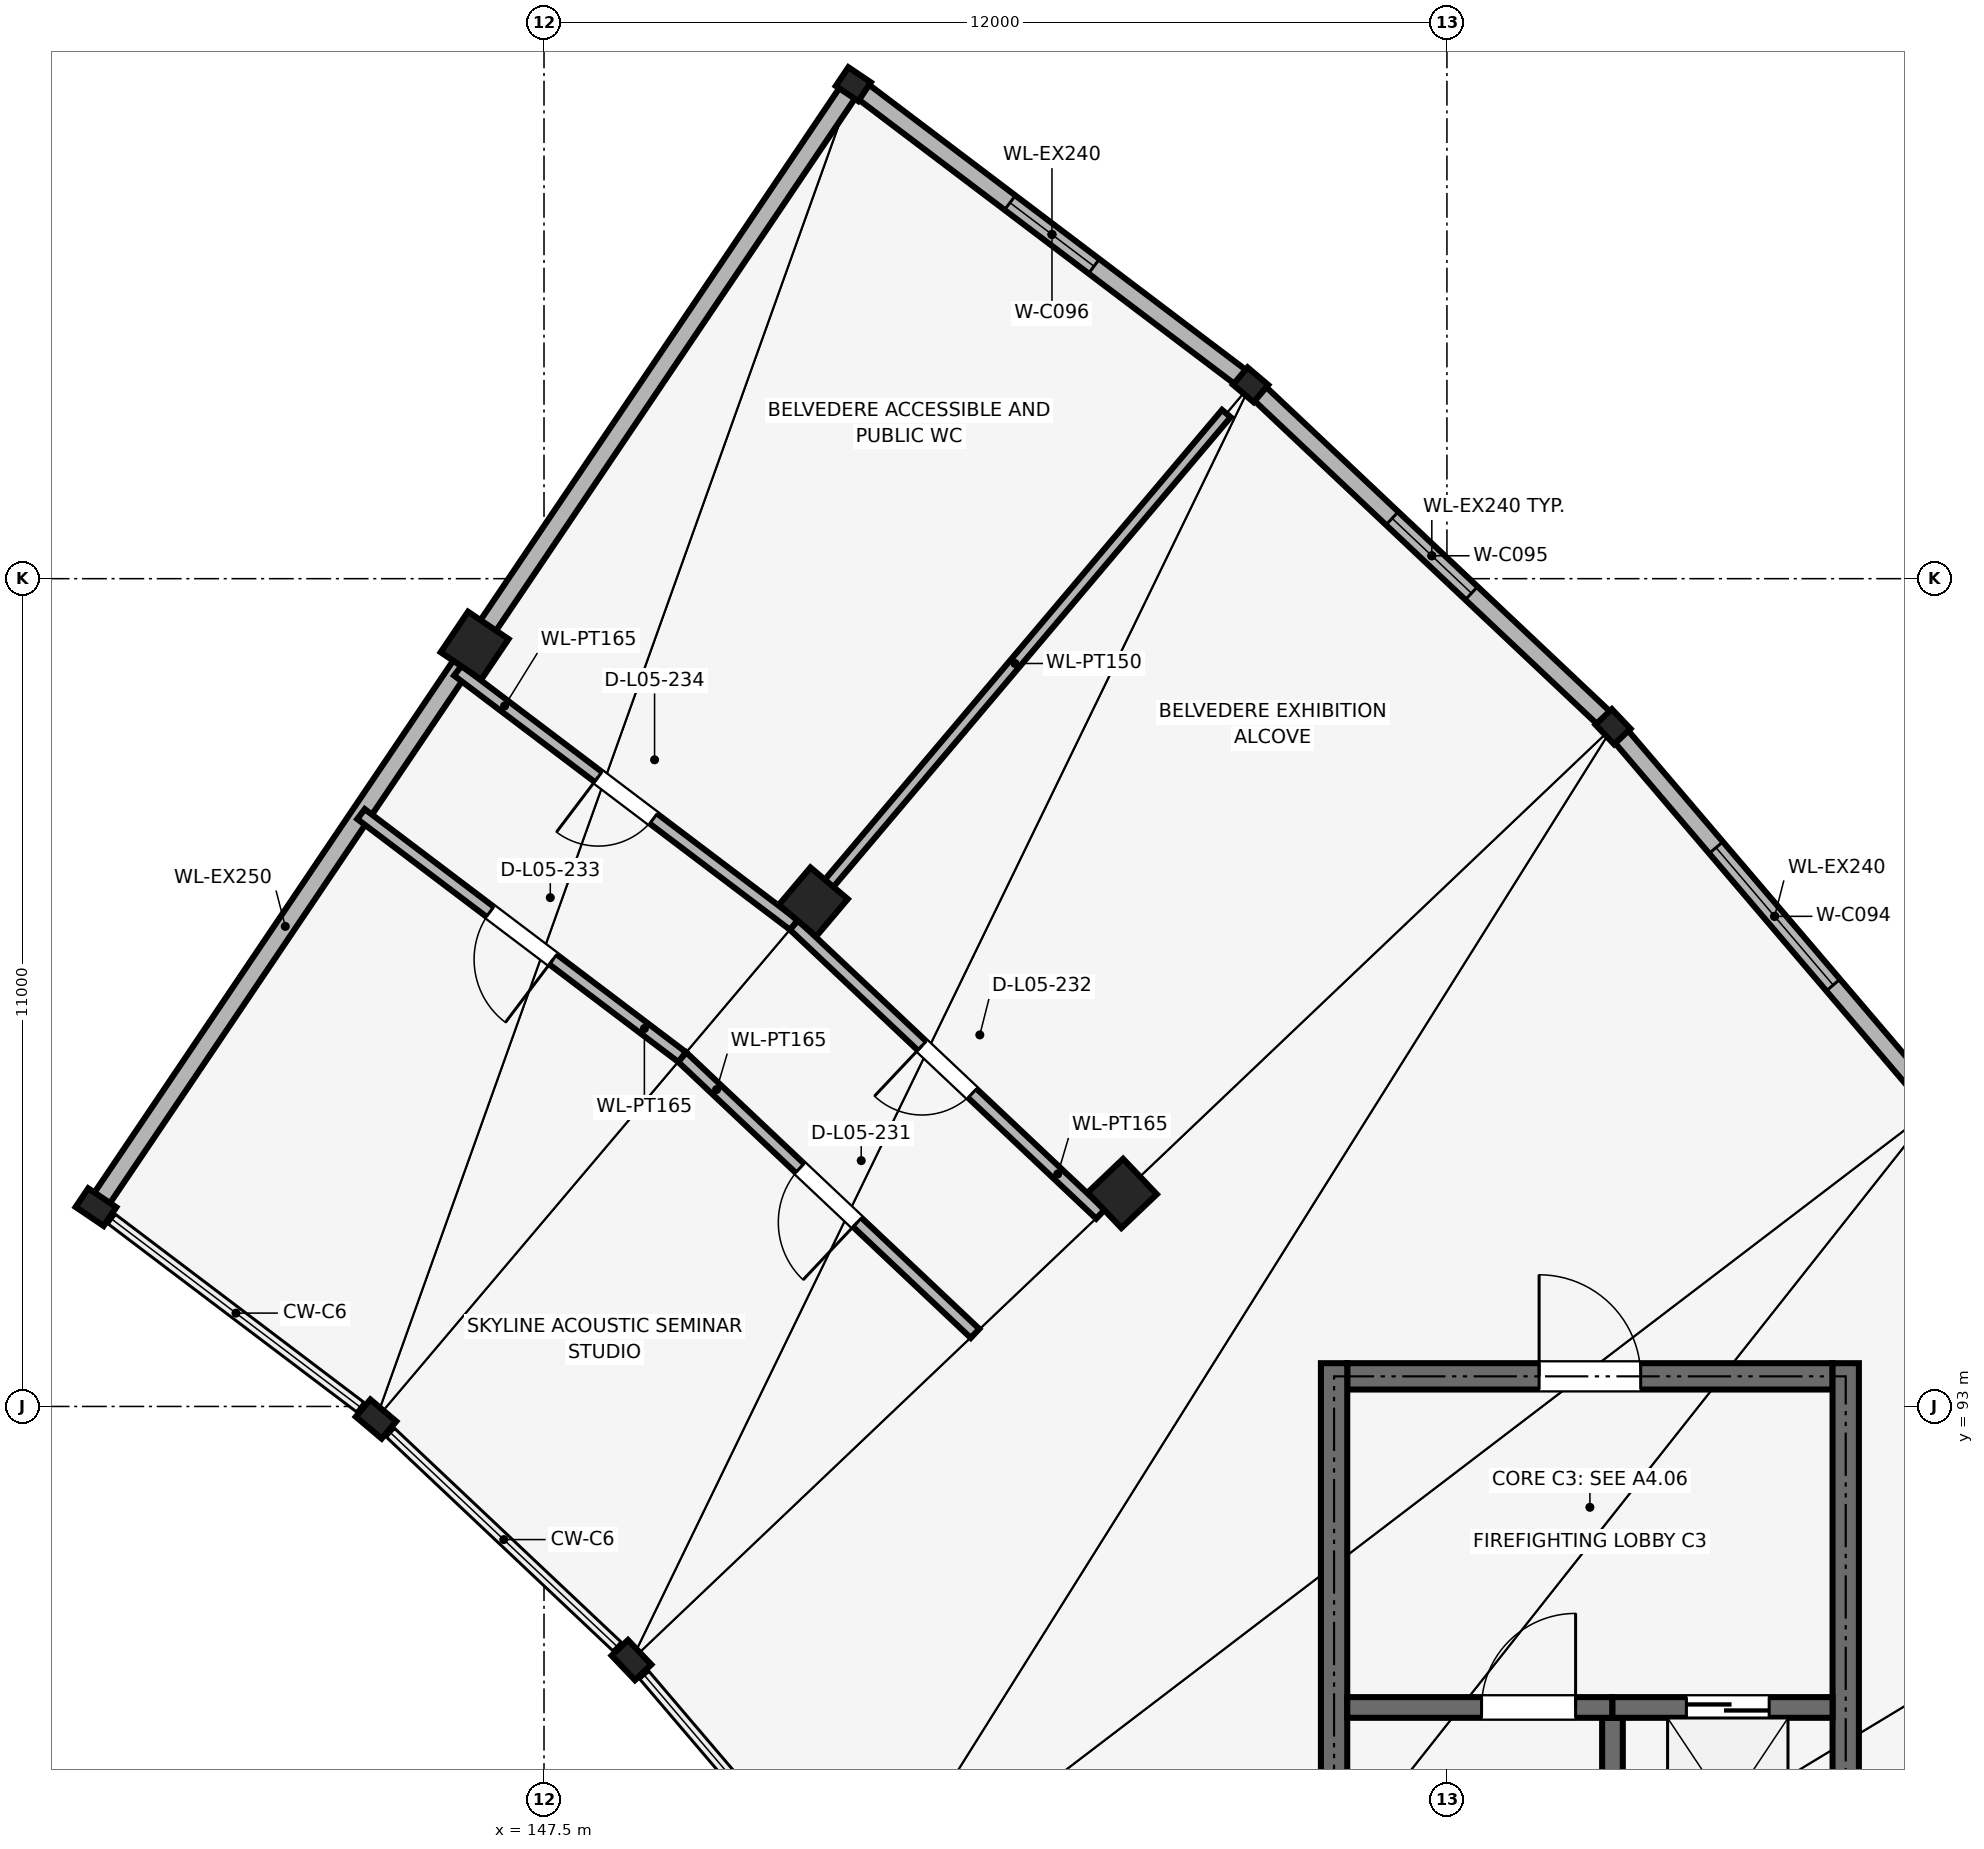
"""IFC4 building model, lengths in metres.
Left out: names, types, materials, properties, quantities, classifications, styles, units other than length and angle.
Written with IfcOpenShell. Run it as: python <this file> out.ifc"""

import sys

from ifc_helpers import new_model, si_unit, direction, frame, frame_2d, origin, origin_2d, place, context, subcontext, project, spatial, rectangle, i_section, extrude, element, fill, save


model = new_model("IFC4")
c1 = context("Model", 3, precision=1e-05, world=origin(), true_north=direction((0.0, 1.0)))
c2 = subcontext(c1, "Body", "Model", "MODEL_VIEW")
j1 = project(units=[si_unit("LENGTHUNIT", "METRE"), si_unit("PLANEANGLEUNIT", "RADIAN")], contexts=[c1])
p1 = place(None, origin())
s1 = spatial("IfcSite", under=j1, at=p1, CompositionType="ELEMENT")
p2 = place(p1, origin())
s2 = spatial("IfcBuilding", under=s1, at=p2, CompositionType="ELEMENT")
p3 = place(p2, frame((0.0, 0.0, 22.8)))
s3 = spatial("IfcBuildingStorey", under=s2, at=p3, CompositionType="ELEMENT", Elevation=22.8)
p4 = place(p3, frame((148.662, 89.629, 0.0), z_axis=(0.0, 0.0, 1.0), x_axis=(0.724653130187, 0.689113808387, 0.0)))
e1 = element("IfcColumn", 1, at=p4, inside=s3, PredefinedType="COLUMN", context=c2, shape_type="SweptSolid", body=[
    extrude(i_section(OverallWidth=0.3, OverallDepth=0.45, WebThickness=0.014, FlangeThickness=0.026, FilletRadius=0.027, at=origin_2d()), origin(), (0.0, 0.0, 1.0), 3.74),
])
p5 = place(p3, frame((155.185, 95.831, 0.0), z_axis=(0.0, 0.0, 1.0), x_axis=(0.724653130187, 0.689113808387, 0.0)))
e2 = element("IfcColumn", 2, at=p5, inside=s3, PredefinedType="COLUMN", context=c2, shape_type="SweptSolid", body=[
    extrude(rectangle(XDim=0.65, YDim=0.65, at=origin_2d()), origin(), (0.0, 0.0, 1.0), 4.84),
])
p6 = place(p3, frame((161.707, 102.032, 0.0), z_axis=(0.0, 0.0, 1.0), x_axis=(0.724653130187, 0.689113808387, 0.0)))
e3 = element("IfcColumn", 3, at=p6, inside=s3, PredefinedType="COLUMN", context=c2, shape_type="SweptSolid", body=[
    extrude(i_section(OverallWidth=0.3, OverallDepth=0.36, WebThickness=0.012, FlangeThickness=0.022, FilletRadius=0.027, at=origin_2d()), origin(), (0.0, 0.0, 1.0), 5.94),
])
p7 = place(p3, frame((145.267, 92.833, 0.0), z_axis=(0.0, 0.0, 1.0), x_axis=(0.645724263505, 0.763570674869, 0.0)))
e4 = element("IfcColumn", 4, at=p7, inside=s3, PredefinedType="COLUMN", context=c2, shape_type="SweptSolid", body=[
    extrude(i_section(OverallWidth=0.3, OverallDepth=0.45, WebThickness=0.014, FlangeThickness=0.026, FilletRadius=0.027, at=origin_2d()), origin(), (0.0, 0.0, 1.0), 3.74),
])
p8 = place(p3, frame((151.079, 99.704, 0.0), z_axis=(0.0, 0.0, 1.0), x_axis=(0.645724263505, 0.763570674869, 0.0)))
e5 = element("IfcColumn", 5, at=p8, inside=s3, PredefinedType="COLUMN", context=c2, shape_type="SweptSolid", body=[
    extrude(rectangle(XDim=0.65, YDim=0.65, at=origin_2d()), origin(), (0.0, 0.0, 1.0), 4.84),
])
p9 = place(p3, frame((156.891, 106.576, 0.0), z_axis=(0.0, 0.0, 1.0), x_axis=(0.645724263505, 0.763570674869, 0.0)))
e6 = element("IfcColumn", 6, at=p9, inside=s3, PredefinedType="COLUMN", context=c2, shape_type="SweptSolid", body=[
    extrude(i_section(OverallWidth=0.3, OverallDepth=0.36, WebThickness=0.012, FlangeThickness=0.022, FilletRadius=0.027, at=origin_2d()), origin(), (0.0, 0.0, 1.0), 5.94),
])
p10 = place(p3, frame((141.545, 95.649, 0.0), z_axis=(0.0, 0.0, 1.0), x_axis=(0.559192903471, 0.829037572555, 0.0)))
e7 = element("IfcColumn", 7, at=p10, inside=s3, PredefinedType="COLUMN", context=c2, shape_type="SweptSolid", body=[
    extrude(i_section(OverallWidth=0.3, OverallDepth=0.45, WebThickness=0.014, FlangeThickness=0.026, FilletRadius=0.027, at=origin_2d()), origin(), (0.0, 0.0, 1.0), 3.74),
])
p11 = place(p3, frame((146.578, 103.11, 0.0), z_axis=(0.0, 0.0, 1.0), x_axis=(0.559192903471, 0.829037572555, 0.0)))
e8 = element("IfcColumn", 8, at=p11, inside=s3, PredefinedType="COLUMN", context=c2, shape_type="SweptSolid", body=[
    extrude(rectangle(XDim=0.65, YDim=0.65, at=origin_2d()), origin(), (0.0, 0.0, 1.0), 4.84),
])
p12 = place(p3, frame((151.611, 110.571, 0.0), z_axis=(0.0, 0.0, 1.0), x_axis=(0.559192903471, 0.829037572555, 0.0)))
e9 = element("IfcColumn", 9, at=p12, inside=s3, PredefinedType="COLUMN", context=c2, shape_type="SweptSolid", body=[
    extrude(i_section(OverallWidth=0.3, OverallDepth=0.36, WebThickness=0.012, FlangeThickness=0.022, FilletRadius=0.027, at=origin_2d()), origin(), (0.0, 0.0, 1.0), 5.94),
])
p13 = place(p3, frame((161.72, 102.017, 0.0), z_axis=(0.0, 0.0, 1.0), x_axis=(0.648708464949, -0.761037007973, 0.0)))
e10 = element("IfcWall", 10, at=p13, inside=s3, PredefinedType="SOLIDWALL", context=c2, shape_type="SweptSolid", body=[
    extrude(rectangle(XDim=6.581, YDim=0.24, at=frame_2d((3.291, 0.0))), origin(), (0.0, 0.0, 1.0), 3.543),
])
p14 = place(p13, frame((2.091, 0.0, 0.9)))
e11 = element("IfcOpeningElement", 11, at=p14, cuts=e10, PredefinedType="OPENING", context=c2, shape_type="SweptSolid", body=[
    extrude(rectangle(XDim=2.4, YDim=1.55, at=frame_2d((1.2, 0.775))), frame((0.0, 0.13, 0.0), z_axis=(0.0, -1.0, 0.0), x_axis=(1.0, 0.0, 0.0)), (0.0, 0.0, 1.0), 0.26),
])
p15 = place(p3, frame((156.906, 106.562, 0.0), z_axis=(0.0, 0.0, 1.0), x_axis=(0.727377231984, -0.686237832235, 0.0)))
e12 = element("IfcWall", 12, at=p15, inside=s3, PredefinedType="SOLIDWALL", context=c2, shape_type="SweptSolid", body=[
    extrude(rectangle(XDim=6.581, YDim=0.24, at=frame_2d((3.291, 0.0))), origin(), (0.0, 0.0, 1.0), 3.543),
])
p16 = place(p15, frame((2.566, 0.0, 1.6)))
e13 = element("IfcOpeningElement", 13, at=p16, cuts=e12, PredefinedType="OPENING", context=c2, shape_type="SweptSolid", body=[
    extrude(rectangle(XDim=1.45, YDim=0.95, at=frame_2d((0.725, 0.475))), frame((0.0, 0.13, 0.0), z_axis=(0.0, -1.0, 0.0), x_axis=(1.0, 0.0, 0.0)), (0.0, 0.0, 1.0), 0.26),
])
p17 = place(p3, frame((151.627, 110.559, 0.0), z_axis=(0.0, 0.0, 1.0), x_axis=(0.797477783019, -0.603348311998, 0.0)))
e14 = element("IfcWall", 14, at=p17, inside=s3, PredefinedType="SOLIDWALL", context=c2, shape_type="SweptSolid", body=[
    extrude(rectangle(XDim=6.581, YDim=0.24, at=frame_2d((3.291, 0.0))), origin(), (0.0, 0.0, 1.0), 3.538),
])
p18 = place(p17, frame((2.591, 0.0, 0.85)))
e15 = element("IfcOpeningElement", 15, at=p18, cuts=e14, PredefinedType="OPENING", context=c2, shape_type="SweptSolid", body=[
    extrude(rectangle(XDim=1.4, YDim=1.7, at=frame_2d((0.7, 0.85))), frame((0.0, 0.13, 0.0), z_axis=(0.0, -1.0, 0.0), x_axis=(1.0, 0.0, 0.0)), (0.0, 0.0, 1.0), 0.26),
])
p19 = place(p3, frame((141.556, 95.665, 0.0), z_axis=(0.0, 0.0, 1.0), x_axis=(0.559200466777, 0.829032470991, 0.0)))
e16 = element("IfcWall", 16, at=p19, inside=s3, PredefinedType="SOLIDWALL", context=c2, shape_type="SweptSolid", body=[
    extrude(rectangle(XDim=8.96, YDim=0.25, at=frame_2d((4.48, 0.0))), origin(), (0.0, 0.0, 1.0), 3.538),
])
p20 = place(p3, frame((146.589, 103.127, 0.0), z_axis=(0.0, 0.0, 1.0), x_axis=(0.559213098812, 0.829023950268, 0.0)))
e17 = element("IfcWall", 17, at=p20, inside=s3, PredefinedType="SOLIDWALL", context=c2, shape_type="SweptSolid", body=[
    extrude(rectangle(XDim=8.96, YDim=0.25, at=frame_2d((4.48, 0.0))), origin(), (0.0, 0.0, 1.0), 3.538),
])
p21 = place(p3, frame((158.175, 93.4, 0.0), z_axis=(0.0, 0.0, 1.0), x_axis=(1.0, 0.0, 0.0)))
e18 = element("IfcWall", 18, at=p21, inside=s3, PredefinedType="SHEAR", context=c2, shape_type="SweptSolid", body=[
    extrude(rectangle(XDim=6.45, YDim=0.35, at=frame_2d((3.225, 0.0))), origin(), (0.0, 0.0, 1.0), 3.98),
])
p22 = place(p21, frame((2.55, 0.0, 0.0)))
e19 = element("IfcOpeningElement", 19, at=p22, cuts=e18, PredefinedType="OPENING", context=c2, shape_type="SweptSolid", body=[
    extrude(rectangle(XDim=1.35, YDim=2.2, at=frame_2d((0.675, 1.1))), frame((0.0, 0.185, 0.0), z_axis=(0.0, -1.0, 0.0), x_axis=(1.0, 0.0, 0.0)), (0.0, 0.0, 1.0), 0.37),
])
for number, where, z_axis, x_axis in (
    (20, (158.0, 81.975, 0.0), (0.0, 0.0, 1.0), (0.0, 1.0, 0.0)),
    (21, (164.8, 81.975, 0.0), (0.0, 0.0, 1.0), (0.0, 1.0, 0.0)),
):
    element("IfcWall", number, at=place(p3, frame(where, z_axis=z_axis, x_axis=x_axis)), inside=s3, PredefinedType="SHEAR", context=c2, shape_type="SweptSolid", body=[
        extrude(rectangle(XDim=11.6, YDim=0.35, at=frame_2d((5.8, 0.0))), origin(), (0.0, 0.0, 1.0), 3.98),
    ])
p23 = place(p3, frame((161.7, 81.975, 0.0), z_axis=(0.0, 0.0, 1.0), x_axis=(0.0, 1.0, 0.0)))
e22 = element("IfcWall", 22, at=p23, inside=s3, PredefinedType="SHEAR", context=c2, shape_type="SweptSolid", body=[
    extrude(rectangle(XDim=6.887, YDim=0.275, at=frame_2d((3.444, 0.0))), origin(), (0.0, 0.0, 1.0), 3.98),
])
p24 = place(p3, frame((158.175, 89.0, 0.0), z_axis=(0.0, 0.0, 1.0), x_axis=(1.0, 0.0, 0.0)))
e23 = element("IfcWall", 23, at=p24, inside=s3, PredefinedType="SHEAR", context=c2, shape_type="SweptSolid", body=[
    extrude(rectangle(XDim=3.525, YDim=0.275, at=frame_2d((1.762, 0.0))), origin(), (0.0, 0.0, 1.0), 3.98),
])
p25 = place(p24, frame((1.785, 0.0, 0.0)))
e24 = element("IfcOpeningElement", 24, at=p25, cuts=e23, PredefinedType="OPENING", context=c2, shape_type="SweptSolid", body=[
    extrude(rectangle(XDim=1.25, YDim=2.15, at=frame_2d((0.625, 1.075))), frame((0.0, 0.147, 0.0), z_axis=(0.0, -1.0, 0.0), x_axis=(1.0, 0.0, 0.0)), (0.0, 0.0, 1.0), 0.295),
])
p26 = place(p3, frame((161.7, 89.0, 0.0), z_axis=(0.0, 0.0, 1.0), x_axis=(1.0, 0.0, 0.0)))
e25 = element("IfcWall", 25, at=p26, inside=s3, PredefinedType="SHEAR", context=c2, shape_type="SweptSolid", body=[
    extrude(rectangle(XDim=2.925, YDim=0.275, at=frame_2d((1.462, 0.0))), origin(), (0.0, 0.0, 1.0), 3.98),
])
p27 = place(p26, frame((0.982, 0.0, 0.0)))
e26 = element("IfcOpeningElement", 26, at=p27, cuts=e25, PredefinedType="OPENING", context=c2, shape_type="SweptSolid", body=[
    extrude(rectangle(XDim=1.1, YDim=2.15, at=frame_2d((0.55, 1.075))), frame((0.0, 0.147, 0.0), z_axis=(0.0, -1.0, 0.0), x_axis=(1.0, 0.0, 0.0)), (0.0, 0.0, 1.0), 0.295),
])
p28 = place(p3, frame((153.228, 93.97, 0.0), z_axis=(0.0, 0.0, 1.0), x_axis=(-0.7273609966, 0.68625504051, 0.0)))
e27 = element("IfcWall", 27, at=p28, inside=s3, PredefinedType="PARTITIONING", context=c2, shape_type="SweptSolid", body=[
    extrude(rectangle(XDim=5.351, YDim=0.165, at=frame_2d((2.676, 0.0))), origin(), (0.0, 0.0, 1.0), 3.545),
])
p29 = place(p28, frame((2.151, 0.0, 0.0)))
e28 = element("IfcOpeningElement", 28, at=p29, cuts=e27, PredefinedType="OPENING", context=c2, shape_type="SweptSolid", body=[
    extrude(rectangle(XDim=1.05, YDim=2.15, at=frame_2d((0.525, 1.075))), frame((0.0, 0.093, 0.0), z_axis=(0.0, -1.0, 0.0), x_axis=(1.0, 0.0, 0.0)), (0.0, 0.0, 1.0), 0.185),
])
p30 = place(p3, frame((154.895, 95.555, 0.0), z_axis=(0.0, 0.0, 1.0), x_axis=(-0.727402273239, 0.686211288807, 0.0)))
e29 = element("IfcWall", 29, at=p30, inside=s3, PredefinedType="PARTITIONING", context=c2, shape_type="SweptSolid", body=[
    extrude(rectangle(XDim=5.601, YDim=0.165, at=frame_2d((2.801, 0.0))), origin(), (0.0, 0.0, 1.0), 3.545),
])
p31 = place(p30, frame((2.341, 0.0, 0.0)))
e30 = element("IfcOpeningElement", 30, at=p31, cuts=e29, PredefinedType="OPENING", context=c2, shape_type="SweptSolid", body=[
    extrude(rectangle(XDim=0.92, YDim=2.1, at=frame_2d((0.46, 1.05))), frame((0.0, 0.093, 0.0), z_axis=(0.0, -1.0, 0.0), x_axis=(1.0, 0.0, 0.0)), (0.0, 0.0, 1.0), 0.185),
])
p32 = place(p3, frame((149.336, 97.643, 0.0), z_axis=(0.0, 0.0, 1.0), x_axis=(-0.797474612376, 0.603352502784, 0.0)))
e31 = element("IfcWall", 31, at=p32, inside=s3, PredefinedType="PARTITIONING", context=c2, shape_type="SweptSolid", body=[
    extrude(rectangle(XDim=5.351, YDim=0.165, at=frame_2d((2.676, 0.0))), origin(), (0.0, 0.0, 1.0), 3.54),
])
p33 = place(p32, frame((2.151, 0.0, 0.0)))
e32 = element("IfcOpeningElement", 32, at=p33, cuts=e31, PredefinedType="OPENING", context=c2, shape_type="SweptSolid", body=[
    extrude(rectangle(XDim=1.05, YDim=2.15, at=frame_2d((0.525, 1.075))), frame((0.0, 0.093, 0.0), z_axis=(0.0, -1.0, 0.0), x_axis=(1.0, 0.0, 0.0)), (0.0, 0.0, 1.0), 0.185),
])
p34 = place(p3, frame((150.821, 99.399, 0.0), z_axis=(0.0, 0.0, 1.0), x_axis=(-0.797450601932, 0.603384237015, 0.0)))
e33 = element("IfcWall", 33, at=p34, inside=s3, PredefinedType="PARTITIONING", context=c2, shape_type="SweptSolid", body=[
    extrude(rectangle(XDim=5.601, YDim=0.165, at=frame_2d((2.8, 0.0))), origin(), (0.0, 0.0, 1.0), 3.54),
])
p35 = place(p34, frame((2.34, 0.0, 0.0)))
e34 = element("IfcOpeningElement", 34, at=p35, cuts=e33, PredefinedType="OPENING", context=c2, shape_type="SweptSolid", body=[
    extrude(rectangle(XDim=0.92, YDim=2.1, at=frame_2d((0.46, 1.05))), frame((0.0, 0.093, 0.0), z_axis=(0.0, -1.0, 0.0), x_axis=(1.0, 0.0, 0.0)), (0.0, 0.0, 1.0), 0.185),
])
p36 = place(p3, frame((150.95, 99.552, 0.0), z_axis=(0.0, 0.0, 1.0), x_axis=(0.645745976221, 0.763552312677, 0.0)))
e35 = element("IfcWall", 35, at=p36, inside=s3, PredefinedType="PARTITIONING", context=c2, shape_type="SweptSolid", body=[
    extrude(rectangle(XDim=8.7, YDim=0.15, at=frame_2d((4.35, 0.0))), origin(), (0.0, 0.0, 1.0), 3.545),
])
p37 = place(p14, origin())
e36 = element("IfcWindow", 36, at=p37, inside=s3, PartitioningType="SINGLE_PANEL", PredefinedType="WINDOW", context=c2, shape_type="SweptSolid", body=[
    extrude(rectangle(XDim=2.4, YDim=1.55, at=frame_2d((1.2, 0.775))), frame((0.0, 0.03, 0.0), z_axis=(0.0, -1.0, 0.0), x_axis=(1.0, 0.0, 0.0)), (0.0, 0.0, 1.0), 0.06),
])
fill(e11, e36)
p38 = place(p16, origin())
e37 = element("IfcWindow", 37, at=p38, inside=s3, PartitioningType="SINGLE_PANEL", PredefinedType="WINDOW", context=c2, shape_type="SweptSolid", body=[
    extrude(rectangle(XDim=1.45, YDim=0.95, at=frame_2d((0.725, 0.475))), frame((0.0, 0.03, 0.0), z_axis=(0.0, -1.0, 0.0), x_axis=(1.0, 0.0, 0.0)), (0.0, 0.0, 1.0), 0.06),
])
fill(e13, e37)
p39 = place(p18, origin())
e38 = element("IfcWindow", 38, at=p39, inside=s3, PartitioningType="SINGLE_PANEL", PredefinedType="WINDOW", context=c2, shape_type="SweptSolid", body=[
    extrude(rectangle(XDim=1.4, YDim=1.7, at=frame_2d((0.7, 0.85))), frame((0.0, 0.03, 0.0), z_axis=(0.0, -1.0, 0.0), x_axis=(1.0, 0.0, 0.0)), (0.0, 0.0, 1.0), 0.06),
])
fill(e15, e38)
p40 = place(p25, origin())
e39 = element("IfcDoor", 39, at=p40, inside=s3, OperationType="SINGLE_SWING_RIGHT", PredefinedType="DOOR", context=c2, shape_type="SweptSolid", body=[
    extrude(rectangle(XDim=1.25, YDim=2.15, at=frame_2d((0.625, 1.075))), frame((0.0, 0.025, 0.0), z_axis=(0.0, -1.0, 0.0), x_axis=(1.0, 0.0, 0.0)), (0.0, 0.0, 1.0), 0.05),
])
fill(e24, e39)
p41 = place(p27, origin())
e40 = element("IfcDoor", 40, at=p41, inside=s3, OperationType="DOUBLE_DOOR_SLIDING", PredefinedType="DOOR", context=c2, shape_type="SweptSolid", body=[
    extrude(rectangle(XDim=1.1, YDim=2.15, at=frame_2d((0.55, 1.075))), frame((0.0, 0.025, 0.0), z_axis=(0.0, -1.0, 0.0), x_axis=(1.0, 0.0, 0.0)), (0.0, 0.0, 1.0), 0.05),
])
fill(e26, e40)
p42 = place(p22, origin())
e41 = element("IfcDoor", 41, at=p42, inside=s3, OperationType="SINGLE_SWING_LEFT", PredefinedType="DOOR", context=c2, shape_type="SweptSolid", body=[
    extrude(rectangle(XDim=1.35, YDim=2.2, at=frame_2d((0.675, 1.1))), frame((0.0, 0.025, 0.0), z_axis=(0.0, -1.0, 0.0), x_axis=(1.0, 0.0, 0.0)), (0.0, 0.0, 1.0), 0.05),
])
fill(e19, e41)
p43 = place(p29, origin())
e42 = element("IfcDoor", 42, at=p43, inside=s3, OperationType="SINGLE_SWING_LEFT", PredefinedType="DOOR", context=c2, shape_type="SweptSolid", body=[
    extrude(rectangle(XDim=1.05, YDim=2.15, at=frame_2d((0.525, 1.075))), frame((0.0, 0.025, 0.0), z_axis=(0.0, -1.0, 0.0), x_axis=(1.0, 0.0, 0.0)), (0.0, 0.0, 1.0), 0.05),
])
fill(e28, e42)
p44 = place(p31, origin())
e43 = element("IfcDoor", 43, at=p44, inside=s3, OperationType="SINGLE_SWING_RIGHT", PredefinedType="DOOR", context=c2, shape_type="SweptSolid", body=[
    extrude(rectangle(XDim=0.92, YDim=2.1, at=frame_2d((0.46, 1.05))), frame((0.0, 0.025, 0.0), z_axis=(0.0, -1.0, 0.0), x_axis=(1.0, 0.0, 0.0)), (0.0, 0.0, 1.0), 0.05),
])
fill(e30, e43)
p45 = place(p33, origin())
e44 = element("IfcDoor", 44, at=p45, inside=s3, OperationType="SINGLE_SWING_LEFT", PredefinedType="DOOR", context=c2, shape_type="SweptSolid", body=[
    extrude(rectangle(XDim=1.05, YDim=2.15, at=frame_2d((0.525, 1.075))), frame((0.0, 0.025, 0.0), z_axis=(0.0, -1.0, 0.0), x_axis=(1.0, 0.0, 0.0)), (0.0, 0.0, 1.0), 0.05),
])
fill(e32, e44)
p46 = place(p35, origin())
e45 = element("IfcDoor", 45, at=p46, inside=s3, OperationType="SINGLE_SWING_RIGHT", PredefinedType="DOOR", context=c2, shape_type="SweptSolid", body=[
    extrude(rectangle(XDim=0.92, YDim=2.1, at=frame_2d((0.46, 1.05))), frame((0.0, 0.025, 0.0), z_axis=(0.0, -1.0, 0.0), x_axis=(1.0, 0.0, 0.0)), (0.0, 0.0, 1.0), 0.05),
])
fill(e34, e45)
save(model, sys.argv[1])
